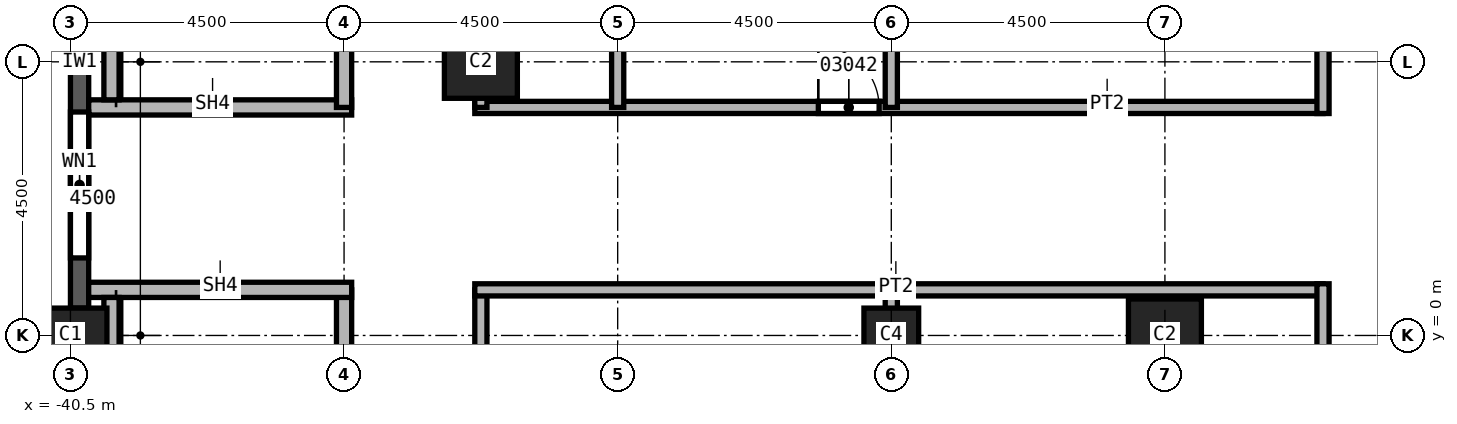
"""IFC4 building model, lengths in metres.
Left out: names, types, materials, properties, quantities, classifications, styles, units other than length and angle.
Written with IfcOpenShell. Run it as: python <this file> out.ifc"""

import sys

from ifc_helpers import new_model, si_unit, direction, frame, frame_2d, origin, origin_2d, place, context, subcontext, project, spatial, rectangle, extrude, element, fill, save


model = new_model("IFC4")
c1 = context("Model", 3, precision=1e-05, world=origin(), true_north=direction((0.0, 1.0)))
c2 = subcontext(c1, "Body", "Model", "MODEL_VIEW")
j1 = project(units=[si_unit("LENGTHUNIT", "METRE"), si_unit("PLANEANGLEUNIT", "RADIAN")], contexts=[c1])
p1 = place(None, origin())
s1 = spatial("IfcSite", under=j1, at=p1, CompositionType="ELEMENT")
p2 = place(p1, origin())
s2 = spatial("IfcBuilding", under=s1, at=p2, CompositionType="ELEMENT")
p3 = place(p2, frame((0.0, 0.0, 92.0)))
s3 = spatial("IfcBuildingStorey", under=s2, at=p3, CompositionType="ELEMENT", Elevation=92.0)
p4 = place(p3, frame((-40.5, 0.0, 0.0), z_axis=(0.0, 0.0, 1.0), x_axis=(0.0, 1.0, 0.0)))
e1 = element("IfcColumn", 1, at=p4, inside=s3, PredefinedType="COLUMN", context=c2, shape_type="SweptSolid", body=[
    extrude(rectangle(XDim=0.9, YDim=1.2, at=origin_2d()), origin(), (0.0, 0.0, 1.0), 3.7),
])
for number, where, z_axis, x_axis in (
    (2, (-33.75, 4.5, 0.0), (0.0, 0.0, 1.0), (1.0, 0.0, 0.0)),
    (3, (-22.5, 0.0, 0.0), (0.0, 0.0, 1.0), (1.0, 0.0, 0.0)),
):
    element("IfcColumn", number, at=place(p3, frame(where, z_axis=z_axis, x_axis=x_axis)), inside=s3, PredefinedType="COLUMN", context=c2, shape_type="SweptSolid", body=[
        extrude(rectangle(XDim=1.2, YDim=1.2, at=origin_2d()), origin(), (0.0, 0.0, 1.0), 3.7),
    ])
p5 = place(p3, frame((-27.0, 0.0, 0.0), z_axis=(0.0, 0.0, 1.0), x_axis=(1.0, 0.0, 0.0)))
e4 = element("IfcColumn", 4, at=p5, inside=s3, PredefinedType="COLUMN", context=c2, shape_type="SweptSolid", body=[
    extrude(rectangle(XDim=0.9, YDim=0.9, at=origin_2d()), origin(), (0.0, 0.0, 1.0), 3.7),
])
p6 = place(p3, frame((-40.35, 8.55, 0.0), z_axis=(0.0, 0.0, 1.0), x_axis=(0.0, -1.0, 0.0)))
e5 = element("IfcWall", 5, at=p6, inside=s3, PredefinedType="SOLIDWALL", context=c2, shape_type="SweptSolid", body=[
    extrude(rectangle(XDim=8.1, YDim=0.3, at=frame_2d((4.05, 0.0))), origin(), (0.0, 0.0, 1.0), 3.1),
])
p7 = place(p6, frame((0.825, 0.0, 0.8)))
e6 = element("IfcOpeningElement", 6, at=p7, cuts=e5, PredefinedType="OPENING", context=c2, shape_type="SweptSolid", body=[
    extrude(rectangle(XDim=2.4, YDim=1.95, at=frame_2d((1.2, 0.975))), frame((0.0, 0.15, 0.0), z_axis=(0.0, -1.0, 0.0), x_axis=(1.0, 0.0, 0.0)), (0.0, 0.0, 1.0), 0.3),
])
p8 = place(p6, frame((4.875, 0.0, 0.8)))
e7 = element("IfcOpeningElement", 7, at=p8, cuts=e5, PredefinedType="OPENING", context=c2, shape_type="SweptSolid", body=[
    extrude(rectangle(XDim=2.4, YDim=1.95, at=frame_2d((1.2, 0.975))), frame((0.0, 0.15, 0.0), z_axis=(0.0, -1.0, 0.0), x_axis=(1.0, 0.0, 0.0)), (0.0, 0.0, 1.0), 0.3),
])
p9 = place(p3, frame((-33.85, 3.75, 0.0), z_axis=(0.0, 0.0, 1.0), x_axis=(1.0, 0.0, 0.0)))
e8 = element("IfcWall", 8, at=p9, inside=s3, PredefinedType="PARTITIONING", context=c2, shape_type="SweptSolid", body=[
    extrude(rectangle(XDim=13.95, YDim=0.2, at=frame_2d((6.975, 0.0))), origin(), (0.0, 0.0, 1.0), 3.7),
])
p10 = place(p9, frame((5.65, 0.0, 0.0)))
e9 = element("IfcOpeningElement", 9, at=p10, cuts=e8, PredefinedType="OPENING", context=c2, shape_type="SweptSolid", body=[
    extrude(rectangle(XDim=1.0, YDim=2.1, at=frame_2d((0.5, 1.05))), frame((0.0, 0.1, 0.0), z_axis=(0.0, -1.0, 0.0), x_axis=(1.0, 0.0, 0.0)), (0.0, 0.0, 1.0), 0.2),
])
p11 = place(p3, frame((-33.75, 0.75, 0.0), z_axis=(0.0, 0.0, 1.0), x_axis=(0.0, -1.0, 0.0)))
e10 = element("IfcWall", 10, at=p11, inside=s3, PredefinedType="PARTITIONING", context=c2, shape_type="SweptSolid", body=[
    extrude(rectangle(XDim=18.45, YDim=0.2, at=frame_2d((9.225, 0.0))), origin(), (0.0, 0.0, 1.0), 3.7),
])
p12 = place(p11, frame((3.4, 0.0, 0.0)))
e11 = element("IfcOpeningElement", 11, at=p12, cuts=e10, PredefinedType="OPENING", context=c2, shape_type="SweptSolid", body=[
    extrude(rectangle(XDim=1.0, YDim=2.1, at=frame_2d((0.5, 1.05))), frame((0.0, 0.1, 0.0), z_axis=(0.0, -1.0, 0.0), x_axis=(1.0, 0.0, 0.0)), (0.0, 0.0, 1.0), 0.2),
])
p13 = place(p3, frame((-33.75, 11.25, 0.0), z_axis=(0.0, 0.0, 1.0), x_axis=(0.0, -1.0, 0.0)))
e12 = element("IfcWall", 12, at=p13, inside=s3, PredefinedType="PARTITIONING", context=c2, shape_type="SweptSolid", body=[
    extrude(rectangle(XDim=7.5, YDim=0.2, at=frame_2d((3.75, 0.0))), origin(), (0.0, 0.0, 1.0), 3.7),
])
p14 = place(p13, frame((0.55, 0.0, 0.0)))
e13 = element("IfcOpeningElement", 13, at=p14, cuts=e12, PredefinedType="OPENING", context=c2, shape_type="SweptSolid", body=[
    extrude(rectangle(XDim=1.0, YDim=2.1, at=frame_2d((0.5, 1.05))), frame((0.0, 0.1, 0.0), z_axis=(0.0, -1.0, 0.0), x_axis=(1.0, 0.0, 0.0)), (0.0, 0.0, 1.0), 0.2),
])
p15 = place(p3, frame((-31.5, 17.4, 0.0), z_axis=(0.0, 0.0, 1.0), x_axis=(0.0, -1.0, 0.0)))
e14 = element("IfcWall", 14, at=p15, inside=s3, PredefinedType="PARTITIONING", context=c2, shape_type="SweptSolid", body=[
    extrude(rectangle(XDim=13.65, YDim=0.2, at=frame_2d((6.825, 0.0))), origin(), (0.0, 0.0, 1.0), 3.7),
])
p16 = place(p3, frame((-27.0, -17.4, 0.0), z_axis=(0.0, 0.0, 1.0), x_axis=(0.0, 1.0, 0.0)))
e15 = element("IfcWall", 15, at=p16, inside=s3, PredefinedType="PARTITIONING", context=c2, shape_type="SweptSolid", body=[
    extrude(rectangle(XDim=18.15, YDim=0.2, at=frame_2d((9.075, 0.0))), origin(), (0.0, 0.0, 1.0), 3.7),
])
p17 = place(p3, frame((-27.0, 3.75, 0.0), z_axis=(0.0, 0.0, 1.0), x_axis=(0.0, 1.0, 0.0)))
e16 = element("IfcWall", 16, at=p17, inside=s3, PredefinedType="PARTITIONING", context=c2, shape_type="SweptSolid", body=[
    extrude(rectangle(XDim=13.65, YDim=0.2, at=frame_2d((6.825, 0.0))), origin(), (0.0, 0.0, 1.0), 3.7),
])
p18 = place(p3, frame((-19.9, 0.75, 0.0), z_axis=(0.0, 0.0, 1.0), x_axis=(-1.0, 0.0, 0.0)))
e17 = element("IfcWall", 17, at=p18, inside=s3, PredefinedType="PARTITIONING", context=c2, shape_type="SweptSolid", body=[
    extrude(rectangle(XDim=13.95, YDim=0.2, at=frame_2d((6.975, 0.0))), origin(), (0.0, 0.0, 1.0), 3.7),
])
p19 = place(p3, frame((-19.9, -24.5, 0.0), z_axis=(0.0, 0.0, 1.0), x_axis=(0.0, 1.0, 0.0)))
e18 = element("IfcWall", 18, at=p19, inside=s3, PredefinedType="PARTITIONING", context=c2, shape_type="SweptSolid", body=[
    extrude(rectangle(XDim=25.35, YDim=0.2, at=frame_2d((12.675, 0.0))), origin(), (0.0, 0.0, 1.0), 3.7),
])
p20 = place(p19, frame((7.3, 0.0, 0.0)))
e19 = element("IfcOpeningElement", 19, at=p20, cuts=e18, PredefinedType="OPENING", context=c2, shape_type="SweptSolid", body=[
    extrude(rectangle(XDim=1.0, YDim=2.1, at=frame_2d((0.5, 1.05))), frame((0.0, 0.1, 0.0), z_axis=(0.0, -1.0, 0.0), x_axis=(1.0, 0.0, 0.0)), (0.0, 0.0, 1.0), 0.2),
])
p21 = place(p19, frame((18.05, 0.0, 0.0)))
e20 = element("IfcOpeningElement", 20, at=p21, cuts=e18, PredefinedType="OPENING", context=c2, shape_type="SweptSolid", body=[
    extrude(rectangle(XDim=1.0, YDim=2.1, at=frame_2d((0.5, 1.05))), frame((0.0, 0.1, 0.0), z_axis=(0.0, -1.0, 0.0), x_axis=(1.0, 0.0, 0.0)), (0.0, 0.0, 1.0), 0.2),
])
p22 = place(p3, frame((-19.9, 3.65, 0.0), z_axis=(0.0, 0.0, 1.0), x_axis=(0.0, 1.0, 0.0)))
e21 = element("IfcWall", 21, at=p22, inside=s3, PredefinedType="PARTITIONING", context=c2, shape_type="SweptSolid", body=[
    extrude(rectangle(XDim=9.95, YDim=0.2, at=frame_2d((4.975, 0.0))), origin(), (0.0, 0.0, 1.0), 3.7),
])
p23 = place(p22, frame((5.2, 0.0, 0.0)))
e22 = element("IfcOpeningElement", 22, at=p23, cuts=e21, PredefinedType="OPENING", context=c2, shape_type="SweptSolid", body=[
    extrude(rectangle(XDim=1.0, YDim=2.1, at=frame_2d((0.5, 1.05))), frame((0.0, 0.1, 0.0), z_axis=(0.0, -1.0, 0.0), x_axis=(1.0, 0.0, 0.0)), (0.0, 0.0, 1.0), 0.2),
])
p24 = place(p22, frame((8.65, 0.0, 0.0)))
e23 = element("IfcOpeningElement", 23, at=p24, cuts=e21, PredefinedType="OPENING", context=c2, shape_type="SweptSolid", body=[
    extrude(rectangle(XDim=1.0, YDim=2.1, at=frame_2d((0.5, 1.05))), frame((0.0, 0.1, 0.0), z_axis=(0.0, -1.0, 0.0), x_axis=(1.0, 0.0, 0.0)), (0.0, 0.0, 1.0), 0.2),
])
p25 = place(p3, frame((-40.2, 3.75, 0.0), z_axis=(0.0, 0.0, 1.0), x_axis=(1.0, 0.0, 0.0)))
e24 = element("IfcWall", 24, at=p25, inside=s3, PredefinedType="SOLIDWALL", context=c2, shape_type="SweptSolid", body=[
    extrude(rectangle(XDim=4.325, YDim=0.25, at=frame_2d((2.163, 0.0))), origin(), (0.0, 0.0, 1.0), 3.7),
])
p26 = place(p3, frame((-36.0, 0.75, 0.0), z_axis=(0.0, 0.0, 1.0), x_axis=(0.0, -1.0, 0.0)))
e25 = element("IfcWall", 25, at=p26, inside=s3, PredefinedType="SOLIDWALL", context=c2, shape_type="SweptSolid", body=[
    extrude(rectangle(XDim=7.625, YDim=0.25, at=frame_2d((3.812, 0.0))), origin(), (0.0, 0.0, 1.0), 3.7),
])
p27 = place(p26, frame((5.95, 0.0, 0.0)))
e26 = element("IfcOpeningElement", 26, at=p27, cuts=e25, PredefinedType="OPENING", context=c2, shape_type="SweptSolid", body=[
    extrude(rectangle(XDim=1.2, YDim=2.1, at=frame_2d((0.6, 1.05))), frame((0.0, 0.125, 0.0), z_axis=(0.0, -1.0, 0.0), x_axis=(1.0, 0.0, 0.0)), (0.0, 0.0, 1.0), 0.25),
])
p28 = place(p3, frame((-36.0, 11.375, 0.0), z_axis=(0.0, 0.0, 1.0), x_axis=(0.0, -1.0, 0.0)))
e27 = element("IfcWall", 27, at=p28, inside=s3, PredefinedType="SOLIDWALL", context=c2, shape_type="SweptSolid", body=[
    extrude(rectangle(XDim=7.625, YDim=0.25, at=frame_2d((3.812, 0.0))), origin(), (0.0, 0.0, 1.0), 3.7),
])
p29 = place(p28, frame((0.4, 0.0, 0.0)))
e28 = element("IfcOpeningElement", 28, at=p29, cuts=e27, PredefinedType="OPENING", context=c2, shape_type="SweptSolid", body=[
    extrude(rectangle(XDim=1.2, YDim=2.1, at=frame_2d((0.6, 1.05))), frame((0.0, 0.125, 0.0), z_axis=(0.0, -1.0, 0.0), x_axis=(1.0, 0.0, 0.0)), (0.0, 0.0, 1.0), 0.25),
])
p30 = place(p3, frame((-35.875, 0.75, 0.0), z_axis=(0.0, 0.0, 1.0), x_axis=(-1.0, 0.0, 0.0)))
e29 = element("IfcWall", 29, at=p30, inside=s3, PredefinedType="SOLIDWALL", context=c2, shape_type="SweptSolid", body=[
    extrude(rectangle(XDim=4.325, YDim=0.25, at=frame_2d((2.163, 0.0))), origin(), (0.0, 0.0, 1.0), 3.7),
])
for number, where, z_axis, x_axis in (
    (30, (-39.825, 3.875, 0.0), (0.0, 0.0, 1.0), (0.0, 1.0, 0.0)),
    (31, (-39.825, -6.625, 0.0), (0.0, 0.0, 1.0), (0.0, 1.0, 0.0)),
):
    element("IfcWall", number, at=place(p3, frame(where, z_axis=z_axis, x_axis=x_axis)), inside=s3, PredefinedType="SOLIDWALL", context=c2, shape_type="SweptSolid", body=[
        extrude(rectangle(XDim=7.25, YDim=0.25, at=frame_2d((3.625, 0.0))), origin(), (0.0, 0.0, 1.0), 3.7),
    ])
p31 = place(p8, origin())
e32 = element("IfcWindow", 32, at=p31, inside=s3, PartitioningType="SINGLE_PANEL", PredefinedType="WINDOW", context=c2, shape_type="SweptSolid", body=[
    extrude(rectangle(XDim=2.4, YDim=1.95, at=frame_2d((1.2, 0.975))), frame((0.0, 0.03, 0.0), z_axis=(0.0, -1.0, 0.0), x_axis=(1.0, 0.0, 0.0)), (0.0, 0.0, 1.0), 0.06),
])
fill(e7, e32)
p32 = place(p10, origin())
e33 = element("IfcDoor", 33, at=p32, inside=s3, OperationType="SINGLE_SWING_LEFT", PredefinedType="DOOR", context=c2, shape_type="SweptSolid", body=[
    extrude(rectangle(XDim=1.0, YDim=2.1, at=frame_2d((0.5, 1.05))), frame((0.0, 0.025, 0.0), z_axis=(0.0, -1.0, 0.0), x_axis=(1.0, 0.0, 0.0)), (0.0, 0.0, 1.0), 0.05),
])
fill(e9, e33)
save(model, sys.argv[1])
